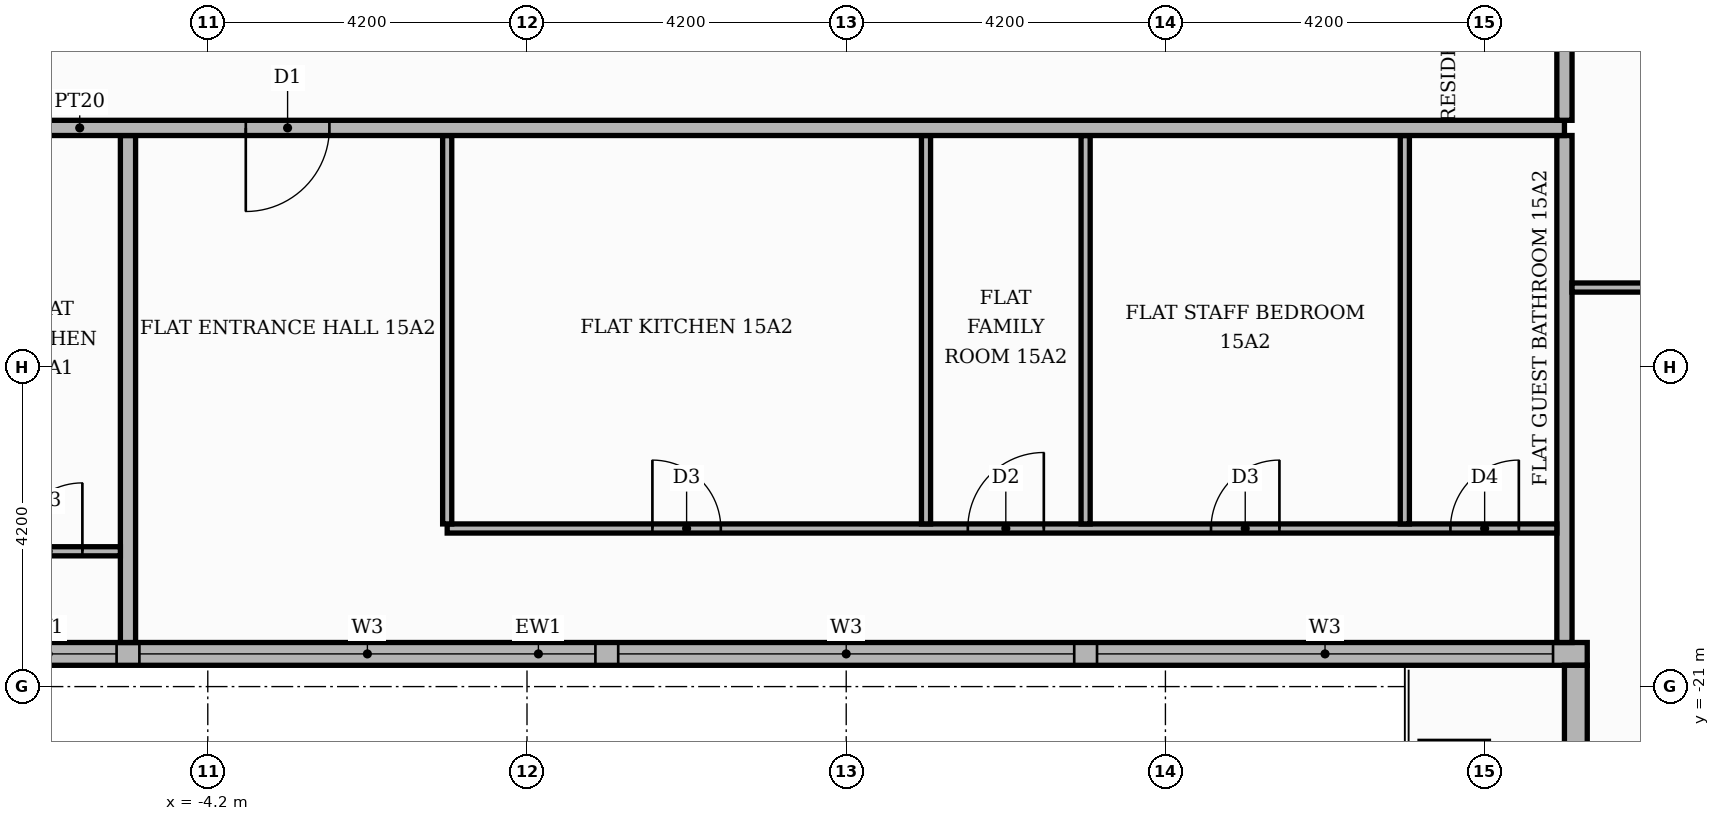
"""IFC4 building model, lengths in metres.
Left out: names, types, materials, properties, quantities, classifications, styles, units other than length and angle.
Written with IfcOpenShell. Run it as: python <this file> out.ifc"""

import sys

from ifc_helpers import new_model, si_unit, direction, frame, frame_2d, origin, place, context, subcontext, project, spatial, rectangle, extrude, element, fill, save


model = new_model("IFC4")
c1 = context("Model", 3, precision=1e-05, world=origin(), true_north=direction((0.0, 1.0)))
c2 = subcontext(c1, "Body", "Model", "MODEL_VIEW")
j1 = project(units=[si_unit("LENGTHUNIT", "METRE"), si_unit("PLANEANGLEUNIT", "RADIAN")], contexts=[c1])
p1 = place(None, origin())
s1 = spatial("IfcSite", under=j1, at=p1, CompositionType="ELEMENT")
p2 = place(p1, origin())
s2 = spatial("IfcBuilding", under=s1, at=p2, CompositionType="ELEMENT")
p3 = place(p2, frame((0.0, 0.0, 66.0)))
s3 = spatial("IfcBuildingStorey", under=s2, at=p3, CompositionType="ELEMENT", Elevation=66.0)
p4 = place(p3, frame((-13.65, -20.57, 0.0), z_axis=(0.0, 0.0, 1.0), x_axis=(1.0, 0.0, 0.0)))
e1 = element("IfcWall", 1, at=p4, inside=s3, PredefinedType="STANDARD", context=c2, shape_type="SweptSolid", body=[
    extrude(rectangle(XDim=27.6, YDim=0.3, at=frame_2d((13.8, 0.0))), origin(), (0.0, 0.0, 1.0), 3.48),
])
p5 = place(p4, frame((0.15, 0.0, 0.9)))
e2 = element("IfcOpeningElement", 2, at=p5, cuts=e1, PredefinedType="OPENING", context=c2, shape_type="SweptSolid", body=[
    extrude(rectangle(XDim=6.0, YDim=2.1, at=frame_2d((3.0, 1.05))), frame((0.0, 0.16, 0.0), z_axis=(0.0, -1.0, 0.0), x_axis=(1.0, 0.0, 0.0)), (0.0, 0.0, 1.0), 0.32),
])
p6 = place(p4, frame((6.45, 0.0, 0.9)))
e3 = element("IfcOpeningElement", 3, at=p6, cuts=e1, PredefinedType="OPENING", context=c2, shape_type="SweptSolid", body=[
    extrude(rectangle(XDim=1.8, YDim=2.1, at=frame_2d((0.9, 1.05))), frame((0.0, 0.16, 0.0), z_axis=(0.0, -1.0, 0.0), x_axis=(1.0, 0.0, 0.0)), (0.0, 0.0, 1.0), 0.32),
])
p7 = place(p4, frame((8.55, 0.0, 0.9)))
e4 = element("IfcOpeningElement", 4, at=p7, cuts=e1, PredefinedType="OPENING", context=c2, shape_type="SweptSolid", body=[
    extrude(rectangle(XDim=6.0, YDim=2.1, at=frame_2d((3.0, 1.05))), frame((0.0, 0.16, 0.0), z_axis=(0.0, -1.0, 0.0), x_axis=(1.0, 0.0, 0.0)), (0.0, 0.0, 1.0), 0.32),
])
p8 = place(p4, frame((14.85, 0.0, 0.9)))
e5 = element("IfcOpeningElement", 5, at=p8, cuts=e1, PredefinedType="OPENING", context=c2, shape_type="SweptSolid", body=[
    extrude(rectangle(XDim=6.0, YDim=2.1, at=frame_2d((3.0, 1.05))), frame((0.0, 0.16, 0.0), z_axis=(0.0, -1.0, 0.0), x_axis=(1.0, 0.0, 0.0)), (0.0, 0.0, 1.0), 0.32),
])
p9 = place(p4, frame((21.15, 0.0, 0.9)))
e6 = element("IfcOpeningElement", 6, at=p9, cuts=e1, PredefinedType="OPENING", context=c2, shape_type="SweptSolid", body=[
    extrude(rectangle(XDim=6.0, YDim=2.1, at=frame_2d((3.0, 1.05))), frame((0.0, 0.16, 0.0), z_axis=(0.0, -1.0, 0.0), x_axis=(1.0, 0.0, 0.0)), (0.0, 0.0, 1.0), 0.32),
])
p10 = place(p3, frame((13.8, -20.72, 0.0), z_axis=(0.0, 0.0, 1.0), x_axis=(0.0, -1.0, 0.0)))
e7 = element("IfcWall", 7, at=p10, inside=s3, PredefinedType="STANDARD", context=c2, shape_type="SweptSolid", body=[
    extrude(rectangle(XDim=5.0, YDim=0.3, at=frame_2d((2.5, 0.0))), origin(), (0.0, 0.0, 1.0), 3.48),
])
p11 = place(p10, frame((1.48, 0.0, 0.0)))
e8 = element("IfcOpeningElement", 8, at=p11, cuts=e7, PredefinedType="OPENING", context=c2, shape_type="SweptSolid", body=[
    extrude(rectangle(XDim=1.8, YDim=2.4, at=frame_2d((0.9, 1.2))), frame((0.0, 0.16, 0.0), z_axis=(0.0, -1.0, 0.0), x_axis=(1.0, 0.0, 0.0)), (0.0, 0.0, 1.0), 0.32),
])
for number, where, z_axis, x_axis in (
    (9, (-5.25, -20.42, 0.0), (0.0, 0.0, 1.0), (0.0, 1.0, 0.0)),
    (10, (13.65, -20.42, 0.0), (0.0, 0.0, 1.0), (0.0, 1.0, 0.0)),
):
    element("IfcWall", number, at=place(p3, frame(where, z_axis=z_axis, x_axis=x_axis)), inside=s3, PredefinedType="PARTITIONING", context=c2, shape_type="SweptSolid", body=[
        extrude(rectangle(XDim=6.67, YDim=0.2, at=frame_2d((3.335, 0.0))), origin(), (0.0, 0.0, 1.0), 3.48),
    ])
p12 = place(p3, frame((-9.45, -19.22, 0.0), z_axis=(0.0, 0.0, 1.0), x_axis=(1.0, 0.0, 0.0)))
e11 = element("IfcWall", 11, at=p12, inside=s3, PredefinedType="PARTITIONING", context=c2, shape_type="SweptSolid", body=[
    extrude(rectangle(XDim=4.1, YDim=0.12, at=frame_2d((2.05, 0.0))), origin(), (0.0, 0.0, 1.0), 3.48),
])
p13 = place(p12, frame((2.7, 0.0, 0.0)))
e12 = element("IfcOpeningElement", 12, at=p13, cuts=e11, PredefinedType="OPENING", context=c2, shape_type="SweptSolid", body=[
    extrude(rectangle(XDim=0.9, YDim=2.1, at=frame_2d((0.45, 1.05))), frame((0.0, 0.07, 0.0), z_axis=(0.0, -1.0, 0.0), x_axis=(1.0, 0.0, 0.0)), (0.0, 0.0, 1.0), 0.14),
])
p14 = place(p3, frame((-1.05, -18.92, 0.0), z_axis=(0.0, 0.0, 1.0), x_axis=(1.0, 0.0, 0.0)))
e13 = element("IfcWall", 13, at=p14, inside=s3, PredefinedType="PARTITIONING", context=c2, shape_type="SweptSolid", body=[
    extrude(rectangle(XDim=14.6, YDim=0.12, at=frame_2d((7.3, 0.0))), origin(), (0.0, 0.0, 1.0), 3.48),
])
p15 = place(p14, frame((2.7, 0.0, 0.0)))
e14 = element("IfcOpeningElement", 14, at=p15, cuts=e13, PredefinedType="OPENING", context=c2, shape_type="SweptSolid", body=[
    extrude(rectangle(XDim=0.9, YDim=2.1, at=frame_2d((0.45, 1.05))), frame((0.0, 0.07, 0.0), z_axis=(0.0, -1.0, 0.0), x_axis=(1.0, 0.0, 0.0)), (0.0, 0.0, 1.0), 0.14),
])
p16 = place(p14, frame((6.85, 0.0, 0.0)))
e15 = element("IfcOpeningElement", 15, at=p16, cuts=e13, PredefinedType="OPENING", context=c2, shape_type="SweptSolid", body=[
    extrude(rectangle(XDim=1.0, YDim=2.1, at=frame_2d((0.5, 1.05))), frame((0.0, 0.07, 0.0), z_axis=(0.0, -1.0, 0.0), x_axis=(1.0, 0.0, 0.0)), (0.0, 0.0, 1.0), 0.14),
])
p17 = place(p14, frame((10.05, 0.0, 0.0)))
e16 = element("IfcOpeningElement", 16, at=p17, cuts=e13, PredefinedType="OPENING", context=c2, shape_type="SweptSolid", body=[
    extrude(rectangle(XDim=0.9, YDim=2.1, at=frame_2d((0.45, 1.05))), frame((0.0, 0.07, 0.0), z_axis=(0.0, -1.0, 0.0), x_axis=(1.0, 0.0, 0.0)), (0.0, 0.0, 1.0), 0.14),
])
p18 = place(p14, frame((13.2, 0.0, 0.0)))
e17 = element("IfcOpeningElement", 17, at=p18, cuts=e13, PredefinedType="OPENING", context=c2, shape_type="SweptSolid", body=[
    extrude(rectangle(XDim=0.9, YDim=2.1, at=frame_2d((0.45, 1.05))), frame((0.0, 0.07, 0.0), z_axis=(0.0, -1.0, 0.0), x_axis=(1.0, 0.0, 0.0)), (0.0, 0.0, 1.0), 0.14),
])
for number, where, z_axis, x_axis in (
    (18, (-1.05, -18.86, 0.0), (0.0, 0.0, 1.0), (0.0, 1.0, 0.0)),
    (19, (5.25, -18.86, 0.0), (0.0, 0.0, 1.0), (0.0, 1.0, 0.0)),
    (20, (7.35, -18.86, 0.0), (0.0, 0.0, 1.0), (0.0, 1.0, 0.0)),
    (21, (11.55, -18.86, 0.0), (0.0, 0.0, 1.0), (0.0, 1.0, 0.0)),
):
    element("IfcWall", number, at=place(p3, frame(where, z_axis=z_axis, x_axis=x_axis)), inside=s3, PredefinedType="PARTITIONING", context=c2, shape_type="SweptSolid", body=[
        extrude(rectangle(XDim=5.11, YDim=0.12, at=frame_2d((2.555, 0.0))), origin(), (0.0, 0.0, 1.0), 3.48),
    ])
p19 = place(p3, frame((13.75, -15.75, 0.0), z_axis=(0.0, 0.0, 1.0), x_axis=(1.0, 0.0, 0.0)))
e22 = element("IfcWall", 22, at=p19, inside=s3, PredefinedType="PARTITIONING", context=c2, shape_type="SweptSolid", body=[
    extrude(rectangle(XDim=6.07, YDim=0.12, at=frame_2d((3.035, 0.0))), origin(), (0.0, 0.0, 1.0), 3.48),
])
p20 = place(p19, frame((2.485, 0.0, 0.0)))
e23 = element("IfcOpeningElement", 23, at=p20, cuts=e22, PredefinedType="OPENING", context=c2, shape_type="SweptSolid", body=[
    extrude(rectangle(XDim=1.0, YDim=2.1, at=frame_2d((0.5, 1.05))), frame((0.0, 0.07, 0.0), z_axis=(0.0, -1.0, 0.0), x_axis=(1.0, 0.0, 0.0)), (0.0, 0.0, 1.0), 0.14),
])
p21 = place(p3, frame((-25.42, -13.65, 0.0), z_axis=(0.0, 0.0, 1.0), x_axis=(1.0, 0.0, 0.0)))
e24 = element("IfcWall", 24, at=p21, inside=s3, PredefinedType="PARTITIONING", context=c2, shape_type="SweptSolid", body=[
    extrude(rectangle(XDim=39.07, YDim=0.2, at=frame_2d((19.535, 0.0))), origin(), (0.0, 0.0, 1.0), 3.48),
])
p22 = place(p21, frame((13.32, 0.0, 0.0)))
e25 = element("IfcOpeningElement", 25, at=p22, cuts=e24, PredefinedType="OPENING", context=c2, shape_type="SweptSolid", body=[
    extrude(rectangle(XDim=1.1, YDim=2.4, at=frame_2d((0.55, 1.2))), frame((0.0, 0.11, 0.0), z_axis=(0.0, -1.0, 0.0), x_axis=(1.0, 0.0, 0.0)), (0.0, 0.0, 1.0), 0.22),
])
p23 = place(p21, frame((21.72, 0.0, 0.0)))
e26 = element("IfcOpeningElement", 26, at=p23, cuts=e24, PredefinedType="OPENING", context=c2, shape_type="SweptSolid", body=[
    extrude(rectangle(XDim=1.1, YDim=2.4, at=frame_2d((0.55, 1.2))), frame((0.0, 0.11, 0.0), z_axis=(0.0, -1.0, 0.0), x_axis=(1.0, 0.0, 0.0)), (0.0, 0.0, 1.0), 0.22),
])
p24 = place(p3, frame((13.65, -13.55, 0.0), z_axis=(0.0, 0.0, 1.0), x_axis=(0.0, 1.0, 0.0)))
e27 = element("IfcWall", 27, at=p24, inside=s3, PredefinedType="PARTITIONING", context=c2, shape_type="SweptSolid", body=[
    extrude(rectangle(XDim=8.2, YDim=0.2, at=frame_2d((4.1, 0.0))), origin(), (0.0, 0.0, 1.0), 3.48),
])
p25 = place(p24, frame((1.45, 0.0, 0.0)))
e28 = element("IfcOpeningElement", 28, at=p25, cuts=e27, PredefinedType="OPENING", context=c2, shape_type="SweptSolid", body=[
    extrude(rectangle(XDim=1.1, YDim=2.4, at=frame_2d((0.55, 1.2))), frame((0.0, 0.11, 0.0), z_axis=(0.0, -1.0, 0.0), x_axis=(1.0, 0.0, 0.0)), (0.0, 0.0, 1.0), 0.22),
])
p26 = place(p6, origin())
e29 = element("IfcWindow", 29, at=p26, inside=s3, PartitioningType="SINGLE_PANEL", PredefinedType="WINDOW", context=c2, shape_type="SweptSolid", body=[
    extrude(rectangle(XDim=1.8, YDim=2.1, at=frame_2d((0.9, 1.05))), frame((0.0, 0.03, 0.0), z_axis=(0.0, -1.0, 0.0), x_axis=(1.0, 0.0, 0.0)), (0.0, 0.0, 1.0), 0.06),
])
fill(e3, e29)
p27 = place(p7, origin())
e30 = element("IfcWindow", 30, at=p27, inside=s3, PartitioningType="SINGLE_PANEL", PredefinedType="WINDOW", context=c2, shape_type="SweptSolid", body=[
    extrude(rectangle(XDim=6.0, YDim=2.1, at=frame_2d((3.0, 1.05))), frame((0.0, 0.03, 0.0), z_axis=(0.0, -1.0, 0.0), x_axis=(1.0, 0.0, 0.0)), (0.0, 0.0, 1.0), 0.06),
])
fill(e4, e30)
p28 = place(p8, origin())
e31 = element("IfcWindow", 31, at=p28, inside=s3, PartitioningType="SINGLE_PANEL", PredefinedType="WINDOW", context=c2, shape_type="SweptSolid", body=[
    extrude(rectangle(XDim=6.0, YDim=2.1, at=frame_2d((3.0, 1.05))), frame((0.0, 0.03, 0.0), z_axis=(0.0, -1.0, 0.0), x_axis=(1.0, 0.0, 0.0)), (0.0, 0.0, 1.0), 0.06),
])
fill(e5, e31)
p29 = place(p9, origin())
e32 = element("IfcWindow", 32, at=p29, inside=s3, PartitioningType="SINGLE_PANEL", PredefinedType="WINDOW", context=c2, shape_type="SweptSolid", body=[
    extrude(rectangle(XDim=6.0, YDim=2.1, at=frame_2d((3.0, 1.05))), frame((0.0, 0.03, 0.0), z_axis=(0.0, -1.0, 0.0), x_axis=(1.0, 0.0, 0.0)), (0.0, 0.0, 1.0), 0.06),
])
fill(e6, e32)
p30 = place(p13, origin())
e33 = element("IfcDoor", 33, at=p30, inside=s3, OperationType="SINGLE_SWING_RIGHT", PredefinedType="DOOR", context=c2, shape_type="SweptSolid", body=[
    extrude(rectangle(XDim=0.9, YDim=2.1, at=frame_2d((0.45, 1.05))), frame((0.0, 0.025, 0.0), z_axis=(0.0, -1.0, 0.0), x_axis=(1.0, 0.0, 0.0)), (0.0, 0.0, 1.0), 0.05),
])
fill(e12, e33)
p31 = place(p23, frame((1.1, 0.0, 0.0), z_axis=(0.0, 0.0, 1.0), x_axis=(-1.0, 0.0, 0.0)))
e34 = element("IfcDoor", 34, at=p31, inside=s3, OperationType="SINGLE_SWING_LEFT", PredefinedType="DOOR", context=c2, shape_type="SweptSolid", body=[
    extrude(rectangle(XDim=1.1, YDim=2.4, at=frame_2d((0.55, 1.2))), frame((0.0, 0.025, 0.0), z_axis=(0.0, -1.0, 0.0), x_axis=(1.0, 0.0, 0.0)), (0.0, 0.0, 1.0), 0.05),
])
fill(e26, e34)
p32 = place(p15, origin())
e35 = element("IfcDoor", 35, at=p32, inside=s3, OperationType="SINGLE_SWING_LEFT", PredefinedType="DOOR", context=c2, shape_type="SweptSolid", body=[
    extrude(rectangle(XDim=0.9, YDim=2.1, at=frame_2d((0.45, 1.05))), frame((0.0, 0.025, 0.0), z_axis=(0.0, -1.0, 0.0), x_axis=(1.0, 0.0, 0.0)), (0.0, 0.0, 1.0), 0.05),
])
fill(e14, e35)
p33 = place(p16, origin())
e36 = element("IfcDoor", 36, at=p33, inside=s3, OperationType="SINGLE_SWING_RIGHT", PredefinedType="DOOR", context=c2, shape_type="SweptSolid", body=[
    extrude(rectangle(XDim=1.0, YDim=2.1, at=frame_2d((0.5, 1.05))), frame((0.0, 0.025, 0.0), z_axis=(0.0, -1.0, 0.0), x_axis=(1.0, 0.0, 0.0)), (0.0, 0.0, 1.0), 0.05),
])
fill(e15, e36)
p34 = place(p17, origin())
e37 = element("IfcDoor", 37, at=p34, inside=s3, OperationType="SINGLE_SWING_RIGHT", PredefinedType="DOOR", context=c2, shape_type="SweptSolid", body=[
    extrude(rectangle(XDim=0.9, YDim=2.1, at=frame_2d((0.45, 1.05))), frame((0.0, 0.025, 0.0), z_axis=(0.0, -1.0, 0.0), x_axis=(1.0, 0.0, 0.0)), (0.0, 0.0, 1.0), 0.05),
])
fill(e16, e37)
p35 = place(p18, origin())
e38 = element("IfcDoor", 38, at=p35, inside=s3, OperationType="SINGLE_SWING_RIGHT", PredefinedType="DOOR", context=c2, shape_type="SweptSolid", body=[
    extrude(rectangle(XDim=0.9, YDim=2.1, at=frame_2d((0.45, 1.05))), frame((0.0, 0.025, 0.0), z_axis=(0.0, -1.0, 0.0), x_axis=(1.0, 0.0, 0.0)), (0.0, 0.0, 1.0), 0.05),
])
fill(e17, e38)
save(model, sys.argv[1])
